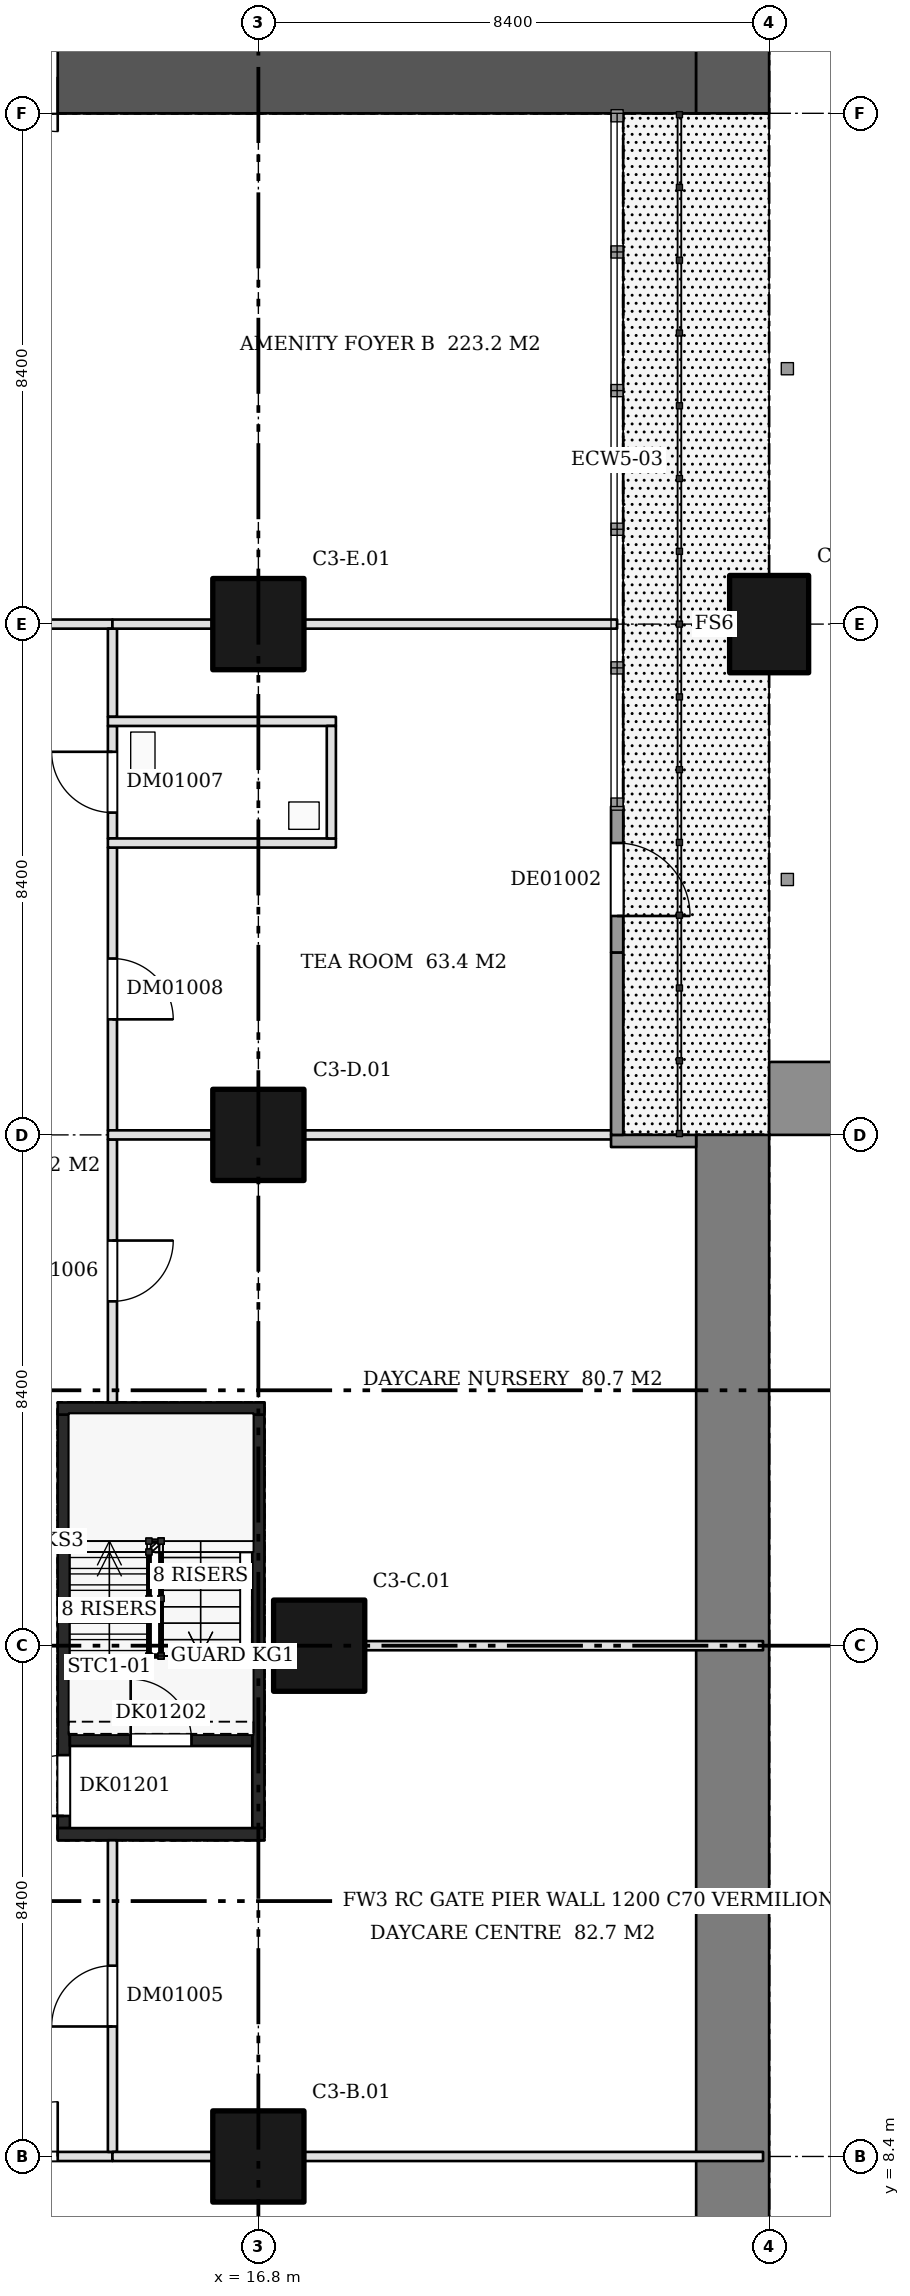
"""IFC4 building model, lengths in metres.
Left out: names, types, materials, properties, quantities, classifications, styles, units other than length and angle.
Written with IfcOpenShell. Run it as: python <this file> out.ifc"""

import sys

from ifc_helpers import new_model, si_unit, direction, frame, frame_2d, origin, origin_2d, place, context, subcontext, project, spatial, polyline, rectangle, outline, extrude, element, fill, save


model = new_model("IFC4")
c1 = context("Model", 3, precision=1e-05, world=origin(), true_north=direction((0.0, 1.0)))
c2 = subcontext(c1, "Body", "Model", "MODEL_VIEW")
j1 = project(units=[si_unit("LENGTHUNIT", "METRE"), si_unit("PLANEANGLEUNIT", "RADIAN")], contexts=[c1])
p1 = place(None, origin())
s1 = spatial("IfcSite", under=j1, at=p1, CompositionType="ELEMENT")
p2 = place(p1, origin())
s2 = spatial("IfcBuilding", under=s1, at=p2, CompositionType="ELEMENT")
p3 = place(p2, frame((0.0, 0.0, 9.0)))
s3 = spatial("IfcBuildingStorey", under=s2, at=p3, CompositionType="ELEMENT", Elevation=9.0)
for number, where, z_axis, x_axis in (
    (1, (16.8, 8.4, 0.0), (0.0, 0.0, 1.0), (1.0, 0.0, 0.0)),
    (2, (17.8, 16.8, 0.0), (0.0, 0.0, 1.0), (1.0, 0.0, 0.0)),
    (3, (16.8, 25.2, 0.0), (0.0, 0.0, 1.0), (1.0, 0.0, 0.0)),
    (4, (16.8, 33.6, 0.0), (0.0, 0.0, 1.0), (1.0, 0.0, 0.0)),
):
    element("IfcColumn", number, at=place(p3, frame(where, z_axis=z_axis, x_axis=x_axis)), inside=s3, PredefinedType="COLUMN", context=c2, shape_type="SweptSolid", body=[
        extrude(rectangle(XDim=1.5, YDim=1.5, at=origin_2d()), origin(), (0.0, 0.0, 1.0), 4.95),
    ])
p4 = place(p3, frame((25.2, 33.6, 0.0), z_axis=(0.0, 0.0, 1.0), x_axis=(0.0, 1.0, 0.0)))
e5 = element("IfcColumn", 5, at=p4, inside=s3, PredefinedType="COLUMN", context=c2, shape_type="SweptSolid", body=[
    extrude(rectangle(XDim=1.6, YDim=1.3, at=origin_2d()), origin(), (0.0, 0.0, 1.0), 4.95),
])
p5 = place(p3, frame((24.6, 0.0, 0.0), z_axis=(0.0, 0.0, 1.0), x_axis=(0.0, 1.0, 0.0)))
e6 = element("IfcWall", 6, at=p5, inside=s3, PredefinedType="SHEAR", context=c2, shape_type="SweptSolid", body=[
    extrude(rectangle(XDim=25.2, YDim=1.2, at=frame_2d((12.6, 0.0))), origin(), (0.0, 0.0, 1.0), 4.95),
])
p6 = place(p3, frame((25.2, 25.8, 4.95), z_axis=(0.0, 1.0, 0.0), x_axis=(1.0, 0.0, 0.0)))
e7 = element("IfcWall", 7, at=p6, inside=s3, PredefinedType="SHEAR", context=c2, shape_type="SweptSolid", body=[
    extrude(outline(polyline([(0.0, 0.0), (16.8, 0.0), (16.8, 4.95), (14.053, 4.95), (13.966, 4.804), (13.491, 4.157), (12.968, 3.57), (12.4, 3.05), (11.794, 2.601), (11.155, 2.228), (10.49, 1.933), (9.805, 1.721), (9.106, 1.593), (8.4, 1.55), (7.694, 1.593), (6.995, 1.721), (6.31, 1.933), (5.645, 2.228), (5.006, 2.601), (4.4, 3.05), (3.833, 3.57), (3.309, 4.157), (2.834, 4.804), (2.747, 4.95), (0.0, 4.95), (0.0, 0.0)])), origin(), (0.0, 0.0, -1.0), 1.2),
])
p7 = place(p3, frame((24.6, 58.8, 0.0), z_axis=(0.0, 0.0, 1.0), x_axis=(0.0, -1.0, 0.0)))
e8 = element("IfcWall", 8, at=p7, inside=s3, PredefinedType="SHEAR", context=c2, shape_type="SweptSolid", body=[
    extrude(rectangle(XDim=16.8, YDim=1.2, at=frame_2d((8.4, 0.0))), origin(), (0.0, 0.0, 1.0), 4.98),
])
p8 = place(p7, frame((1.8, 0.0, 0.5)))
e9 = element("IfcOpeningElement", 9, at=p8, cuts=e8, PredefinedType="OPENING", context=c2, shape_type="SweptSolid", body=[
    extrude(rectangle(XDim=1.8, YDim=2.4, at=frame_2d((0.9, 1.2))), frame((0.0, 0.61, 0.0), z_axis=(0.0, -1.0, 0.0), x_axis=(1.0, 0.0, 0.0)), (0.0, 0.0, 1.0), 1.22),
])
p9 = place(p7, frame((4.644, 0.0, 1.6)))
e10 = element("IfcOpeningElement", 10, at=p9, cuts=e8, PredefinedType="OPENING", context=c2, shape_type="SweptSolid", body=[
    extrude(rectangle(XDim=1.2, YDim=1.2, at=frame_2d((0.6, 0.6))), frame((0.0, 0.61, 0.0), z_axis=(0.0, -1.0, 0.0), x_axis=(1.0, 0.0, 0.0)), (0.0, 0.0, 1.0), 1.22),
])
p10 = place(p7, frame((6.45, 0.0, 1.6)))
e11 = element("IfcOpeningElement", 11, at=p10, cuts=e8, PredefinedType="OPENING", context=c2, shape_type="SweptSolid", body=[
    extrude(rectangle(XDim=1.8, YDim=1.2, at=frame_2d((0.9, 0.6))), frame((0.0, 0.61, 0.0), z_axis=(0.0, -1.0, 0.0), x_axis=(1.0, 0.0, 0.0)), (0.0, 0.0, 1.0), 1.22),
])
p11 = place(p7, frame((12.65, 0.0, 0.5)))
e12 = element("IfcOpeningElement", 12, at=p11, cuts=e8, PredefinedType="OPENING", context=c2, shape_type="SweptSolid", body=[
    extrude(rectangle(XDim=1.8, YDim=2.4, at=frame_2d((0.9, 1.2))), frame((0.0, 0.61, 0.0), z_axis=(0.0, -1.0, 0.0), x_axis=(1.0, 0.0, 0.0)), (0.0, 0.0, 1.0), 1.22),
])
p12 = place(p3, frame((9.6, 42.6, 0.0), z_axis=(0.0, 0.0, 1.0), x_axis=(1.0, 0.0, 0.0)))
e13 = element("IfcWall", 13, at=p12, inside=s3, PredefinedType="SHEAR", context=c2, shape_type="SweptSolid", body=[
    extrude(rectangle(XDim=14.4, YDim=1.2, at=frame_2d((7.2, 0.0))), origin(), (0.0, 0.0, 1.0), 4.98),
])
p13 = place(p12, frame((2.1, 0.0, 0.0)))
e14 = element("IfcOpeningElement", 14, at=p13, cuts=e13, PredefinedType="OPENING", context=c2, shape_type="SweptSolid", body=[
    extrude(rectangle(XDim=1.8, YDim=2.1, at=frame_2d((0.9, 1.05))), frame((0.0, 0.61, 0.0), z_axis=(0.0, -1.0, 0.0), x_axis=(1.0, 0.0, 0.0)), (0.0, 0.0, 1.0), 1.22),
])
p14 = place(p3, frame((13.6, 13.8, 0.0), z_axis=(0.0, 0.0, 1.0), x_axis=(0.0, 1.0, 0.0)))
e15 = element("IfcWall", 15, at=p14, inside=s3, PredefinedType="SHEAR", context=c2, shape_type="SweptSolid", body=[
    extrude(rectangle(XDim=6.8, YDim=0.2, at=frame_2d((3.4, 0.0))), origin(), (0.0, 0.0, 1.0), 4.98),
])
p15 = place(p14, frame((0.2, 0.0, 0.0)))
e16 = element("IfcOpeningElement", 16, at=p15, cuts=e15, PredefinedType="OPENING", context=c2, shape_type="SweptSolid", body=[
    extrude(rectangle(XDim=1.0, YDim=2.1, at=frame_2d((0.5, 1.05))), frame((0.0, 0.11, 0.0), z_axis=(0.0, -1.0, 0.0), x_axis=(1.0, 0.0, 0.0)), (0.0, 0.0, 1.0), 0.22),
])
p16 = place(p3, frame((16.8, 13.8, 0.0), z_axis=(0.0, 0.0, 1.0), x_axis=(0.0, 1.0, 0.0)))
e17 = element("IfcWall", 17, at=p16, inside=s3, PredefinedType="SHEAR", context=c2, shape_type="SweptSolid", body=[
    extrude(rectangle(XDim=6.8, YDim=0.2, at=frame_2d((3.4, 0.0))), origin(), (0.0, 0.0, 1.0), 4.98),
])
for number, where, z_axis, x_axis in (
    (18, (13.5, 13.7, 0.0), (0.0, 0.0, 1.0), (1.0, 0.0, 0.0)),
    (19, (13.5, 20.7, 0.0), (0.0, 0.0, 1.0), (1.0, 0.0, 0.0)),
):
    element("IfcWall", number, at=place(p3, frame(where, z_axis=z_axis, x_axis=x_axis)), inside=s3, PredefinedType="SHEAR", context=c2, shape_type="SweptSolid", body=[
        extrude(rectangle(XDim=3.4, YDim=0.2, at=frame_2d((1.7, 0.0))), origin(), (0.0, 0.0, 1.0), 4.98),
    ])
p17 = place(p3, frame((13.7, 15.25, 0.0), z_axis=(0.0, 0.0, 1.0), x_axis=(1.0, 0.0, 0.0)))
e20 = element("IfcWall", 20, at=p17, inside=s3, PredefinedType="SHEAR", context=c2, shape_type="SweptSolid", body=[
    extrude(rectangle(XDim=3.0, YDim=0.2, at=frame_2d((1.5, 0.0))), origin(), (0.0, 0.0, 1.0), 4.98),
])
p18 = place(p17, frame((1.0, 0.0, 0.0)))
e21 = element("IfcOpeningElement", 21, at=p18, cuts=e20, PredefinedType="OPENING", context=c2, shape_type="SweptSolid", body=[
    extrude(rectangle(XDim=1.0, YDim=2.1, at=frame_2d((0.5, 1.05))), frame((0.0, 0.11, 0.0), z_axis=(0.0, -1.0, 0.0), x_axis=(1.0, 0.0, 0.0)), (0.0, 0.0, 1.0), 0.22),
])
p19 = place(p3, frame((10.8, 8.4, 0.0), z_axis=(0.0, 0.0, 1.0), x_axis=(1.0, 0.0, 0.0)))
e22 = element("IfcWall", 22, at=p19, inside=s3, PredefinedType="PARTITIONING", context=c2, shape_type="SweptSolid", body=[
    extrude(rectangle(XDim=3.6, YDim=0.15, at=frame_2d((1.8, 0.0))), origin(), (0.0, 0.0, 1.0), 4.95),
])
p20 = place(p19, frame((0.9, 0.0, 0.0)))
e23 = element("IfcOpeningElement", 23, at=p20, cuts=e22, PredefinedType="OPENING", context=c2, shape_type="SweptSolid", body=[
    extrude(rectangle(XDim=1.8, YDim=2.1, at=frame_2d((0.9, 1.05))), frame((0.0, 0.085, 0.0), z_axis=(0.0, -1.0, 0.0), x_axis=(1.0, 0.0, 0.0)), (0.0, 0.0, 1.0), 0.17),
])
p21 = place(p3, frame((10.8, 33.6, 0.0), z_axis=(0.0, 0.0, 1.0), x_axis=(1.0, 0.0, 0.0)))
e24 = element("IfcWall", 24, at=p21, inside=s3, PredefinedType="PARTITIONING", context=c2, shape_type="SweptSolid", body=[
    extrude(rectangle(XDim=3.6, YDim=0.15, at=frame_2d((1.8, 0.0))), origin(), (0.0, 0.0, 1.0), 4.95),
])
p22 = place(p3, frame((14.4, 8.475, 0.0), z_axis=(0.0, 0.0, 1.0), x_axis=(0.0, 1.0, 0.0)))
e25 = element("IfcWall", 25, at=p22, inside=s3, PredefinedType="PARTITIONING", context=c2, shape_type="SweptSolid", body=[
    extrude(rectangle(XDim=5.125, YDim=0.15, at=frame_2d((2.562, 0.0))), origin(), (0.0, 0.0, 1.0), 4.95),
])
p23 = place(p22, frame((2.062, 0.0, 0.0)))
e26 = element("IfcOpeningElement", 26, at=p23, cuts=e25, PredefinedType="OPENING", context=c2, shape_type="SweptSolid", body=[
    extrude(rectangle(XDim=1.0, YDim=2.1, at=frame_2d((0.5, 1.05))), frame((0.0, 0.085, 0.0), z_axis=(0.0, -1.0, 0.0), x_axis=(1.0, 0.0, 0.0)), (0.0, 0.0, 1.0), 0.17),
])
p24 = place(p3, frame((14.4, 8.4, 0.0), z_axis=(0.0, 0.0, 1.0), x_axis=(1.0, 0.0, 0.0)))
e27 = element("IfcWall", 27, at=p24, inside=s3, PredefinedType="PARTITIONING", context=c2, shape_type="SweptSolid", body=[
    extrude(rectangle(XDim=1.65, YDim=0.15, at=frame_2d((0.825, 0.0))), origin(), (0.0, 0.0, 1.0), 4.95),
])
p25 = place(p3, frame((17.55, 8.4, 0.0), z_axis=(0.0, 0.0, 1.0), x_axis=(1.0, 0.0, 0.0)))
e28 = element("IfcWall", 28, at=p25, inside=s3, PredefinedType="PARTITIONING", context=c2, shape_type="SweptSolid", body=[
    extrude(rectangle(XDim=7.55, YDim=0.15, at=frame_2d((3.775, 0.0))), origin(), (0.0, 0.0, 1.0), 4.95),
])
p26 = place(p3, frame((14.4, 20.8, 0.0), z_axis=(0.0, 0.0, 1.0), x_axis=(0.0, 1.0, 0.0)))
e29 = element("IfcWall", 29, at=p26, inside=s3, PredefinedType="PARTITIONING", context=c2, shape_type="SweptSolid", body=[
    extrude(rectangle(XDim=4.325, YDim=0.15, at=frame_2d((2.163, 0.0))), origin(), (0.0, 0.0, 1.0), 4.95),
])
p27 = place(p26, frame((1.663, 0.0, 0.0)))
e30 = element("IfcOpeningElement", 30, at=p27, cuts=e29, PredefinedType="OPENING", context=c2, shape_type="SweptSolid", body=[
    extrude(rectangle(XDim=1.0, YDim=2.1, at=frame_2d((0.5, 1.05))), frame((0.0, 0.085, 0.0), z_axis=(0.0, -1.0, 0.0), x_axis=(1.0, 0.0, 0.0)), (0.0, 0.0, 1.0), 0.17),
])
p28 = place(p3, frame((14.4, 25.275, 0.0), z_axis=(0.0, 0.0, 1.0), x_axis=(0.0, 1.0, 0.0)))
e31 = element("IfcWall", 31, at=p28, inside=s3, PredefinedType="PARTITIONING", context=c2, shape_type="SweptSolid", body=[
    extrude(rectangle(XDim=4.65, YDim=0.15, at=frame_2d((2.325, 0.0))), origin(), (0.0, 0.0, 1.0), 4.95),
])
p29 = place(p28, frame((1.825, 0.0, 0.0)))
e32 = element("IfcOpeningElement", 32, at=p29, cuts=e31, PredefinedType="OPENING", context=c2, shape_type="SweptSolid", body=[
    extrude(rectangle(XDim=1.0, YDim=2.1, at=frame_2d((0.5, 1.05))), frame((0.0, 0.085, 0.0), z_axis=(0.0, -1.0, 0.0), x_axis=(1.0, 0.0, 0.0)), (0.0, 0.0, 1.0), 0.17),
])
p30 = place(p3, frame((14.325, 25.2, 0.0), z_axis=(0.0, 0.0, 1.0), x_axis=(1.0, 0.0, 0.0)))
e33 = element("IfcWall", 33, at=p30, inside=s3, PredefinedType="PARTITIONING", context=c2, shape_type="SweptSolid", body=[
    extrude(rectangle(XDim=1.725, YDim=0.15, at=frame_2d((0.863, 0.0))), origin(), (0.0, 0.0, 1.0), 4.95),
])
p31 = place(p3, frame((17.55, 25.2, 0.0), z_axis=(0.0, 0.0, 1.0), x_axis=(1.0, 0.0, 0.0)))
e34 = element("IfcWall", 34, at=p31, inside=s3, PredefinedType="PARTITIONING", context=c2, shape_type="SweptSolid", body=[
    extrude(rectangle(XDim=5.15, YDim=0.15, at=frame_2d((2.575, 0.0))), origin(), (0.0, 0.0, 1.0), 4.95),
])
p32 = place(p3, frame((14.4, 30.075, 0.0), z_axis=(0.0, 0.0, 1.0), x_axis=(0.0, 1.0, 0.0)))
e35 = element("IfcWall", 35, at=p32, inside=s3, PredefinedType="PARTITIONING", context=c2, shape_type="SweptSolid", body=[
    extrude(rectangle(XDim=1.85, YDim=0.15, at=frame_2d((0.925, 0.0))), origin(), (0.0, 0.0, 1.0), 4.95),
])
p33 = place(p32, frame((0.425, 0.0, 0.0)))
e36 = element("IfcOpeningElement", 36, at=p33, cuts=e35, PredefinedType="OPENING", context=c2, shape_type="SweptSolid", body=[
    extrude(rectangle(XDim=1.0, YDim=2.1, at=frame_2d((0.5, 1.05))), frame((0.0, 0.085, 0.0), z_axis=(0.0, -1.0, 0.0), x_axis=(1.0, 0.0, 0.0)), (0.0, 0.0, 1.0), 0.17),
])
p34 = place(p3, frame((14.325, 30.0, 0.0), z_axis=(0.0, 0.0, 1.0), x_axis=(1.0, 0.0, 0.0)))
e37 = element("IfcWall", 37, at=p34, inside=s3, PredefinedType="PARTITIONING", context=c2, shape_type="SweptSolid", body=[
    extrude(rectangle(XDim=3.75, YDim=0.15, at=frame_2d((1.875, 0.0))), origin(), (0.0, 0.0, 1.0), 4.95),
])
p35 = place(p3, frame((14.4, 32.075, 0.0), z_axis=(0.0, 0.0, 1.0), x_axis=(0.0, 1.0, 0.0)))
e38 = element("IfcWall", 38, at=p35, inside=s3, PredefinedType="PARTITIONING", context=c2, shape_type="SweptSolid", body=[
    extrude(rectangle(XDim=1.45, YDim=0.15, at=frame_2d((0.725, 0.0))), origin(), (0.0, 0.0, 1.0), 4.95),
])
p36 = place(p3, frame((14.325, 32.0, 0.0), z_axis=(0.0, 0.0, 1.0), x_axis=(1.0, 0.0, 0.0)))
e39 = element("IfcWall", 39, at=p36, inside=s3, PredefinedType="PARTITIONING", context=c2, shape_type="SweptSolid", body=[
    extrude(rectangle(XDim=3.75, YDim=0.15, at=frame_2d((1.875, 0.0))), origin(), (0.0, 0.0, 1.0), 4.95),
])
p37 = place(p3, frame((14.4, 33.6, 0.0), z_axis=(0.0, 0.0, 1.0), x_axis=(1.0, 0.0, 0.0)))
e40 = element("IfcWall", 40, at=p37, inside=s3, PredefinedType="PARTITIONING", context=c2, shape_type="SweptSolid", body=[
    extrude(rectangle(XDim=1.65, YDim=0.15, at=frame_2d((0.825, 0.0))), origin(), (0.0, 0.0, 1.0), 4.95),
])
p38 = place(p3, frame((17.55, 33.6, 0.0), z_axis=(0.0, 0.0, 1.0), x_axis=(1.0, 0.0, 0.0)))
e41 = element("IfcWall", 41, at=p38, inside=s3, PredefinedType="PARTITIONING", context=c2, shape_type="SweptSolid", body=[
    extrude(rectangle(XDim=5.15, YDim=0.15, at=frame_2d((2.575, 0.0))), origin(), (0.0, 0.0, 1.0), 4.95),
])
p39 = place(p3, frame((18.55, 16.8, 0.0), z_axis=(0.0, 0.0, 1.0), x_axis=(1.0, 0.0, 0.0)))
e42 = element("IfcWall", 42, at=p39, inside=s3, PredefinedType="PARTITIONING", context=c2, shape_type="SweptSolid", body=[
    extrude(rectangle(XDim=6.55, YDim=0.15, at=frame_2d((3.275, 0.0))), origin(), (0.0, 0.0, 1.0), 4.95),
])
p40 = place(p3, frame((18.0, 30.075, 0.0), z_axis=(0.0, 0.0, 1.0), x_axis=(0.0, 1.0, 0.0)))
e43 = element("IfcWall", 43, at=p40, inside=s3, PredefinedType="PARTITIONING", context=c2, shape_type="SweptSolid", body=[
    extrude(rectangle(XDim=1.85, YDim=0.15, at=frame_2d((0.925, 0.0))), origin(), (0.0, 0.0, 1.0), 4.95),
])
p41 = place(p3, frame((24.0, 25.1, 0.0), z_axis=(0.0, 0.0, 1.0), x_axis=(-1.0, 0.0, 0.0)))
e44 = element("IfcWall", 44, at=p41, inside=s3, PredefinedType="SOLIDWALL", context=c2, shape_type="SweptSolid", body=[
    extrude(rectangle(XDim=1.4, YDim=0.2, at=frame_2d((0.7, 0.0))), origin(), (0.0, 0.0, 1.0), 4.95),
])
p42 = place(p3, frame((22.7, 25.2, 0.0), z_axis=(0.0, 0.0, 1.0), x_axis=(0.0, 1.0, 0.0)))
e45 = element("IfcWall", 45, at=p42, inside=s3, PredefinedType="SOLIDWALL", context=c2, shape_type="SweptSolid", body=[
    extrude(rectangle(XDim=3.0, YDim=0.2, at=frame_2d((1.5, 0.0))), origin(), (0.0, 0.0, 1.0), 4.95),
])
p43 = place(p3, frame((22.7, 28.2, 0.0), z_axis=(0.0, 0.0, 1.0), x_axis=(0.0, 1.0, 0.0)))
e46 = element("IfcWall", 46, at=p43, inside=s3, PredefinedType="SOLIDWALL", context=c2, shape_type="SweptSolid", body=[
    extrude(rectangle(XDim=2.4, YDim=0.2, at=frame_2d((1.2, 0.0))), origin(), (0.0, 0.0, 1.0), 4.95),
])
p44 = place(p43, frame((0.6, 0.0, 0.0)))
e47 = element("IfcOpeningElement", 47, at=p44, cuts=e46, PredefinedType="OPENING", context=c2, shape_type="SweptSolid", body=[
    extrude(rectangle(XDim=1.2, YDim=2.4, at=frame_2d((0.6, 1.2))), frame((0.0, 0.11, 0.0), z_axis=(0.0, -1.0, 0.0), x_axis=(1.0, 0.0, 0.0)), (0.0, 0.0, 1.0), 0.22),
])
p45 = place(p13, frame((1.8, 0.0, 0.0), z_axis=(0.0, 0.0, 1.0), x_axis=(-1.0, 0.0, 0.0)))
e48 = element("IfcDoor", 48, at=p45, inside=s3, OperationType="DOUBLE_DOOR_SINGLE_SWING", PredefinedType="DOOR", context=c2, shape_type="SweptSolid", body=[
    extrude(rectangle(XDim=1.8, YDim=2.1, at=frame_2d((0.9, 1.05))), frame((0.0, 0.025, 0.0), z_axis=(0.0, -1.0, 0.0), x_axis=(1.0, 0.0, 0.0)), (0.0, 0.0, 1.0), 0.05),
])
fill(e14, e48)
p46 = place(p15, origin())
e49 = element("IfcDoor", 49, at=p46, inside=s3, OperationType="SINGLE_SWING_LEFT", PredefinedType="DOOR", context=c2, shape_type="SweptSolid", body=[
    extrude(rectangle(XDim=1.0, YDim=2.1, at=frame_2d((0.5, 1.05))), frame((0.0, 0.025, 0.0), z_axis=(0.0, -1.0, 0.0), x_axis=(1.0, 0.0, 0.0)), (0.0, 0.0, 1.0), 0.05),
])
fill(e16, e49)
p47 = place(p18, origin())
e50 = element("IfcDoor", 50, at=p47, inside=s3, OperationType="SINGLE_SWING_LEFT", PredefinedType="DOOR", context=c2, shape_type="SweptSolid", body=[
    extrude(rectangle(XDim=1.0, YDim=2.1, at=frame_2d((0.5, 1.05))), frame((0.0, 0.025, 0.0), z_axis=(0.0, -1.0, 0.0), x_axis=(1.0, 0.0, 0.0)), (0.0, 0.0, 1.0), 0.05),
])
fill(e21, e50)
p48 = place(p23, origin())
e51 = element("IfcDoor", 51, at=p48, inside=s3, OperationType="SINGLE_SWING_LEFT", PredefinedType="DOOR", context=c2, shape_type="SweptSolid", body=[
    extrude(rectangle(XDim=1.0, YDim=2.1, at=frame_2d((0.5, 1.05))), frame((0.0, 0.025, 0.0), z_axis=(0.0, -1.0, 0.0), x_axis=(1.0, 0.0, 0.0)), (0.0, 0.0, 1.0), 0.05),
])
fill(e26, e51)
p49 = place(p27, frame((1.0, 0.0, 0.0), z_axis=(0.0, 0.0, 1.0), x_axis=(-1.0, 0.0, 0.0)))
e52 = element("IfcDoor", 52, at=p49, inside=s3, OperationType="SINGLE_SWING_LEFT", PredefinedType="DOOR", context=c2, shape_type="SweptSolid", body=[
    extrude(rectangle(XDim=1.0, YDim=2.1, at=frame_2d((0.5, 1.05))), frame((0.0, 0.025, 0.0), z_axis=(0.0, -1.0, 0.0), x_axis=(1.0, 0.0, 0.0)), (0.0, 0.0, 1.0), 0.05),
])
fill(e30, e52)
p50 = place(p33, origin())
e53 = element("IfcDoor", 53, at=p50, inside=s3, OperationType="SINGLE_SWING_RIGHT", PredefinedType="DOOR", context=c2, shape_type="SweptSolid", body=[
    extrude(rectangle(XDim=1.0, YDim=2.1, at=frame_2d((0.5, 1.05))), frame((0.0, 0.025, 0.0), z_axis=(0.0, -1.0, 0.0), x_axis=(1.0, 0.0, 0.0)), (0.0, 0.0, 1.0), 0.05),
])
fill(e36, e53)
p51 = place(p29, frame((1.0, 0.0, 0.0), z_axis=(0.0, 0.0, 1.0), x_axis=(-1.0, 0.0, 0.0)))
e54 = element("IfcDoor", 54, at=p51, inside=s3, OperationType="SINGLE_SWING_RIGHT", PredefinedType="DOOR", context=c2, shape_type="SweptSolid", body=[
    extrude(rectangle(XDim=1.0, YDim=2.1, at=frame_2d((0.5, 1.05))), frame((0.0, 0.025, 0.0), z_axis=(0.0, -1.0, 0.0), x_axis=(1.0, 0.0, 0.0)), (0.0, 0.0, 1.0), 0.05),
])
fill(e32, e54)
p52 = place(p20, origin())
e55 = element("IfcDoor", 55, at=p52, inside=s3, OperationType="DOUBLE_DOOR_SINGLE_SWING", PredefinedType="DOOR", context=c2, shape_type="SweptSolid", body=[
    extrude(rectangle(XDim=1.8, YDim=2.1, at=frame_2d((0.9, 1.05))), frame((0.0, 0.025, 0.0), z_axis=(0.0, -1.0, 0.0), x_axis=(1.0, 0.0, 0.0)), (0.0, 0.0, 1.0), 0.05),
])
fill(e23, e55)
p53 = place(p44, frame((1.2, 0.0, 0.0), z_axis=(0.0, 0.0, 1.0), x_axis=(-1.0, 0.0, 0.0)))
e56 = element("IfcDoor", 56, at=p53, inside=s3, OperationType="SINGLE_SWING_RIGHT", PredefinedType="DOOR", context=c2, shape_type="SweptSolid", body=[
    extrude(rectangle(XDim=1.2, YDim=2.4, at=frame_2d((0.6, 1.2))), frame((0.0, 0.025, 0.0), z_axis=(0.0, -1.0, 0.0), x_axis=(1.0, 0.0, 0.0)), (0.0, 0.0, 1.0), 0.05),
])
fill(e47, e56)
save(model, sys.argv[1])
